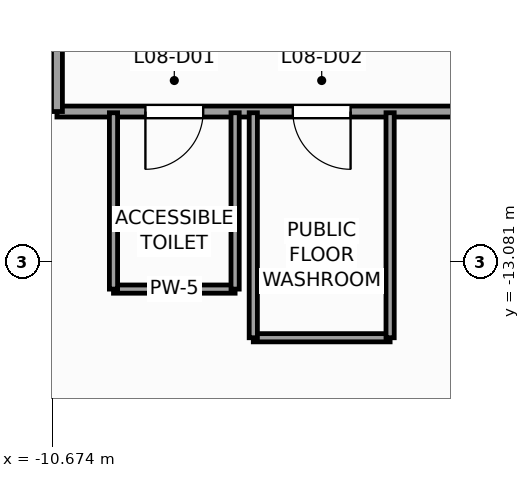
"""IFC4 building model, lengths in metres.
Left out: names, types, materials, properties, quantities, classifications, styles, units other than length and angle.
Written with IfcOpenShell. Run it as: python <this file> out.ifc"""

import sys

from ifc_helpers import new_model, si_unit, direction, frame, frame_2d, origin, place, context, subcontext, project, spatial, rectangle, extrude, source, transform, mapped, element, fill, save


model = new_model("IFC4")
c1 = context("Model", 3, precision=1e-05, world=origin(), true_north=direction((0.0, 1.0)))
c2 = subcontext(c1, "Body", "Model", "MODEL_VIEW")
j1 = project(units=[si_unit("LENGTHUNIT", "METRE"), si_unit("PLANEANGLEUNIT", "RADIAN")], contexts=[c1])
p1 = place(None, origin())
s1 = spatial("IfcSite", under=j1, at=p1, CompositionType="ELEMENT")
p2 = place(p1, origin())
s2 = spatial("IfcBuilding", under=s1, at=p2, CompositionType="ELEMENT")
p3 = place(p2, frame((0.0, 0.0, 38.0)))
s3 = spatial("IfcBuildingStorey", under=s2, at=p3, CompositionType="ELEMENT", Elevation=38.0)
p4 = place(p3, frame((-10.6, -10.6, 0.0), z_axis=(0.0, 0.0, 1.0), x_axis=(1.0, 0.0, 0.0)))
e1 = element("IfcWall", 1, at=p4, inside=s3, PredefinedType="PARTITIONING", context=c2, shape_type="SweptSolid", body=[
    extrude(rectangle(XDim=7.35, YDim=0.18, at=frame_2d((3.675, 0.0))), origin(), (0.0, 0.0, 1.0), 3.72),
])
p5 = place(p4, frame((1.455, 0.0, 0.0)))
e2 = element("IfcOpeningElement", 2, at=p5, cuts=e1, PredefinedType="OPENING", context=c2, shape_type="SweptSolid", body=[
    extrude(rectangle(XDim=0.95, YDim=2.1, at=frame_2d((0.475, 1.05))), frame((0.0, 0.1, 0.0), z_axis=(0.0, -1.0, 0.0), x_axis=(1.0, 0.0, 0.0)), (0.0, 0.0, 1.0), 0.2),
])
p6 = place(p4, frame((3.879, 0.0, 0.0)))
e3 = element("IfcOpeningElement", 3, at=p6, cuts=e1, PredefinedType="OPENING", context=c2, shape_type="SweptSolid", body=[
    extrude(rectangle(XDim=0.95, YDim=2.1, at=frame_2d((0.475, 1.05))), frame((0.0, 0.1, 0.0), z_axis=(0.0, -1.0, 0.0), x_axis=(1.0, 0.0, 0.0)), (0.0, 0.0, 1.0), 0.2),
])
p7 = place(p3, frame((-10.6, -10.6, 0.0), z_axis=(0.0, 0.0, 1.0), x_axis=(0.0, 1.0, 0.0)))
e4 = element("IfcWall", 4, at=p7, inside=s3, PredefinedType="PARTITIONING", context=c2, shape_type="SweptSolid", body=[
    extrude(rectangle(XDim=11.55, YDim=0.18, at=frame_2d((5.775, 0.0))), origin(), (0.0, 0.0, 1.0), 3.72),
])
p8 = place(p3, frame((-9.67, -13.52, 0.0), z_axis=(0.0, 0.0, 1.0), x_axis=(1.0, 0.0, 0.0)))
e5 = element("IfcWall", 5, at=p8, inside=s3, PredefinedType="PARTITIONING", context=c2, shape_type="SweptSolid", body=[
    extrude(rectangle(XDim=2.0, YDim=0.135, at=frame_2d((1.0, 0.0))), origin(), (0.0, 0.0, 1.0), 3.72),
])
for number, where, z_axis, x_axis in (
    (6, (-7.67, -13.52, 0.0), (0.0, 0.0, 1.0), (0.0, 1.0, 0.0)),
    (7, (-9.67, -13.52, 0.0), (0.0, 0.0, 1.0), (0.0, 1.0, 0.0)),
):
    element("IfcWall", number, at=place(p3, frame(where, z_axis=z_axis, x_axis=x_axis)), inside=s3, PredefinedType="PARTITIONING", context=c2, shape_type="SweptSolid", body=[
        extrude(rectangle(XDim=2.9, YDim=0.135, at=frame_2d((1.45, 0.0))), origin(), (0.0, 0.0, 1.0), 3.72),
    ])
p9 = place(p3, frame((-7.371, -14.32, 0.0), z_axis=(0.0, 0.0, 1.0), x_axis=(1.0, 0.0, 0.0)))
e8 = element("IfcWall", 8, at=p9, inside=s3, PredefinedType="PARTITIONING", context=c2, shape_type="SweptSolid", body=[
    extrude(rectangle(XDim=2.25, YDim=0.135, at=frame_2d((1.125, 0.0))), origin(), (0.0, 0.0, 1.0), 3.72),
])
for number, where, z_axis, x_axis in (
    (9, (-5.121, -14.32, 0.0), (0.0, 0.0, 1.0), (0.0, 1.0, 0.0)),
    (10, (-7.371, -14.32, 0.0), (0.0, 0.0, 1.0), (0.0, 1.0, 0.0)),
):
    element("IfcWall", number, at=place(p3, frame(where, z_axis=z_axis, x_axis=x_axis)), inside=s3, PredefinedType="PARTITIONING", context=c2, shape_type="SweptSolid", body=[
        extrude(rectangle(XDim=3.7, YDim=0.135, at=frame_2d((1.85, 0.0))), origin(), (0.0, 0.0, 1.0), 3.72),
    ])
m1 = source(origin(), c2, "Body", "SweptSolid", [
    extrude(rectangle(XDim=0.95, YDim=2.1, at=frame_2d((0.475, 1.05))), frame((0.0, 0.025, 0.0), z_axis=(0.0, -1.0, 0.0), x_axis=(1.0, 0.0, 0.0)), (0.0, 0.0, 1.0), 0.05),
])
p10 = place(p5, frame((0.95, 0.0, 0.0), z_axis=(0.0, 0.0, 1.0), x_axis=(-1.0, 0.0, 0.0)))
e11 = element("IfcDoor", 11, at=p10, inside=s3, OperationType="SINGLE_SWING_LEFT", PredefinedType="DOOR", context=c2, shape_type="MappedRepresentation", body=[
    mapped(m1, transform((0.0, 0.0, 0.0), scale=1.0)),
])
fill(e2, e11)
p11 = place(p6, frame((0.95, 0.0, 0.0), z_axis=(0.0, 0.0, 1.0), x_axis=(-1.0, 0.0, 0.0)))
e12 = element("IfcDoor", 12, at=p11, inside=s3, OperationType="SINGLE_SWING_RIGHT", PredefinedType="DOOR", context=c2, shape_type="MappedRepresentation", body=[
    mapped(m1, transform((0.0, 0.0, 0.0), scale=1.0)),
])
fill(e3, e12)
save(model, sys.argv[1])
